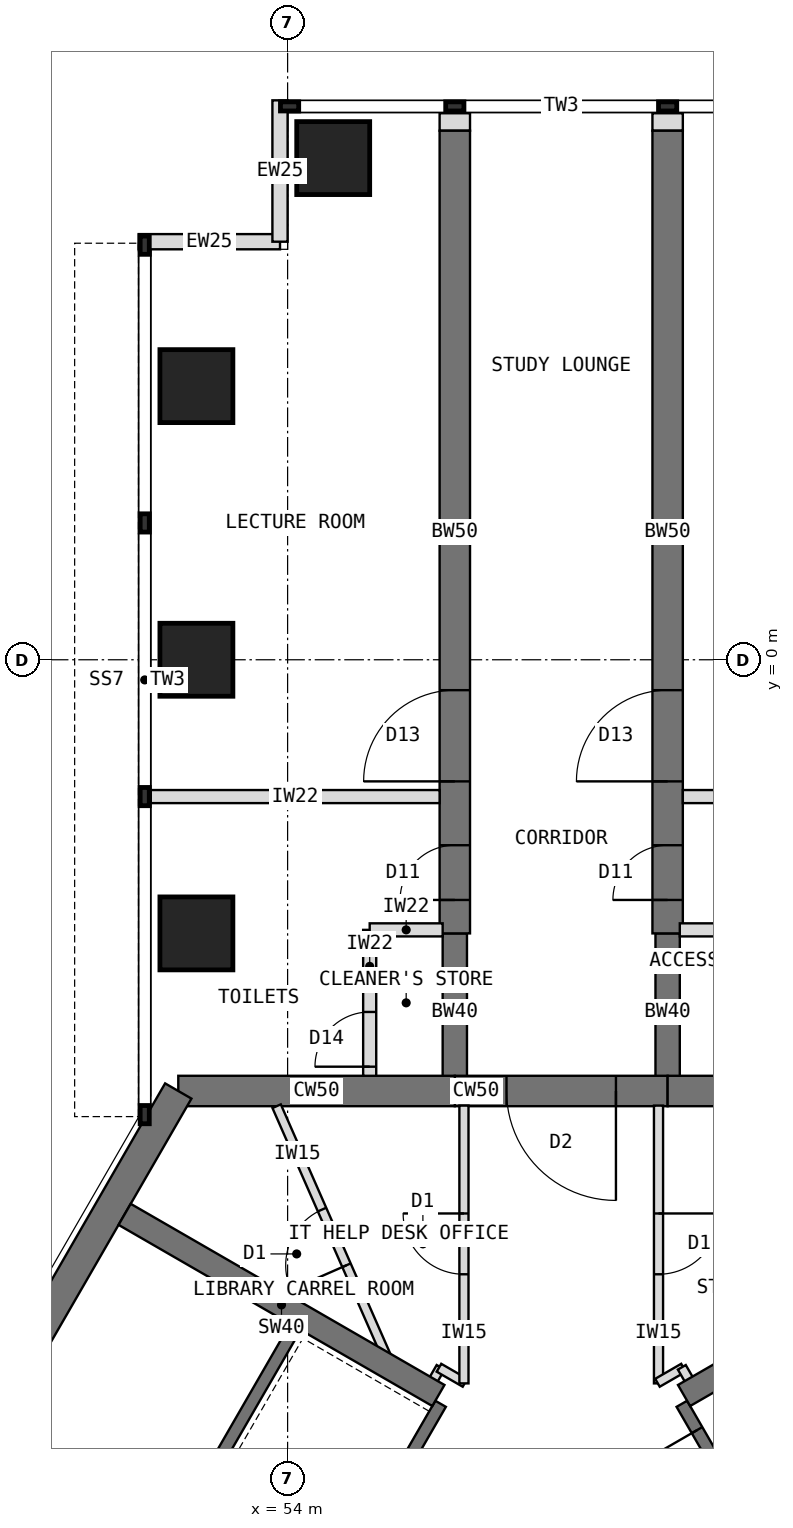
"""IFC4 building model, lengths in metres.
Left out: names, types, materials, properties, quantities, classifications, styles, units other than length and angle.
Written with IfcOpenShell. Run it as: python <this file> out.ifc"""

import sys

from ifc_helpers import new_model, si_unit, direction, frame, frame_2d, origin, origin_2d, place, context, subcontext, project, spatial, rectangle, extrude, element, fill, save


model = new_model("IFC4")
c1 = context("Model", 3, precision=1e-05, world=origin(), true_north=direction((0.0, 1.0)))
c2 = subcontext(c1, "Body", "Model", "MODEL_VIEW")
j1 = project(units=[si_unit("LENGTHUNIT", "METRE"), si_unit("PLANEANGLEUNIT", "RADIAN")], contexts=[c1])
p1 = place(None, origin())
s1 = spatial("IfcSite", under=j1, at=p1, CompositionType="ELEMENT")
p2 = place(p1, origin())
s2 = spatial("IfcBuilding", under=s1, at=p2, CompositionType="ELEMENT")
p3 = place(p2, frame((0.0, 0.0, 174.5)))
s3 = spatial("IfcBuildingStorey", under=s2, at=p3, CompositionType="ELEMENT", Elevation=174.5)
p4 = place(p3, frame((64.798, -7.092, 0.0), z_axis=(0.0, 0.0, 1.0), x_axis=(-1.0, 0.0, 0.0)))
e1 = element("IfcWall", 1, at=p4, inside=s3, PredefinedType="SHEAR", context=c2, shape_type="SweptSolid", body=[
    extrude(rectangle(XDim=4.548, YDim=0.5, at=frame_2d((2.274, 0.0))), origin(), (0.0, 0.0, 1.0), 4.0),
])
p5 = place(p3, frame((60.25, -7.092, 0.0), z_axis=(0.0, 0.0, 1.0), x_axis=(-1.0, 0.0, 0.0)))
e2 = element("IfcWall", 2, at=p5, inside=s3, PredefinedType="SHEAR", context=c2, shape_type="SweptSolid", body=[
    extrude(rectangle(XDim=3.5, YDim=0.5, at=frame_2d((1.75, 0.0))), origin(), (0.0, 0.0, 1.0), 4.0),
])
p6 = place(p5, frame((0.85, 0.0, 0.0)))
e3 = element("IfcOpeningElement", 3, at=p6, cuts=e2, PredefinedType="OPENING", context=c2, shape_type="SweptSolid", body=[
    extrude(rectangle(XDim=1.8, YDim=2.1, at=frame_2d((0.9, 1.05))), frame((0.0, 0.26, 0.0), z_axis=(0.0, -1.0, 0.0), x_axis=(1.0, 0.0, 0.0)), (0.0, 0.0, 1.0), 0.52),
])
p7 = place(p3, frame((56.75, -7.092, 0.0), z_axis=(0.0, 0.0, 1.0), x_axis=(-1.0, 0.0, 0.0)))
e4 = element("IfcWall", 4, at=p7, inside=s3, PredefinedType="SHEAR", context=c2, shape_type="SweptSolid", body=[
    extrude(rectangle(XDim=4.548, YDim=0.5, at=frame_2d((2.274, 0.0))), origin(), (0.0, 0.0, 1.0), 4.0),
])
p8 = place(p3, frame((52.202, -7.092, 0.0), z_axis=(0.0, 0.0, 1.0), x_axis=(-0.500005998175, -0.866021940709, 0.0)))
e5 = element("IfcWall", 5, at=p8, inside=s3, PredefinedType="SHEAR", context=c2, shape_type="SweptSolid", body=[
    extrude(rectangle(XDim=12.596, YDim=0.5, at=frame_2d((6.298, 0.0))), origin(), (0.0, 0.0, 1.0), 4.0),
])
p9 = place(p3, frame((56.75, -7.092, 0.0), z_axis=(0.0, 0.0, 1.0), x_axis=(0.0, 1.0, 0.0)))
e6 = element("IfcWall", 6, at=p9, inside=s3, PredefinedType="SHEAR", context=c2, shape_type="SweptSolid", body=[
    extrude(rectangle(XDim=2.592, YDim=0.4, at=frame_2d((1.296, 0.0))), origin(), (0.0, 0.0, 1.0), 4.0),
])
p10 = place(p3, frame((56.75, -4.5, 0.0), z_axis=(0.0, 0.0, 1.0), x_axis=(0.0, 1.0, 0.0)))
e7 = element("IfcWall", 7, at=p10, inside=s3, PredefinedType="SHEAR", context=c2, shape_type="SweptSolid", body=[
    extrude(rectangle(XDim=13.2, YDim=0.5, at=frame_2d((6.6, 0.0))), origin(), (0.0, 0.0, 1.0), 4.0),
])
p11 = place(p10, frame((0.55, 0.0, 0.0)))
e8 = element("IfcOpeningElement", 8, at=p11, cuts=e7, PredefinedType="OPENING", context=c2, shape_type="SweptSolid", body=[
    extrude(rectangle(XDim=0.9, YDim=2.1, at=frame_2d((0.45, 1.05))), frame((0.0, 0.26, 0.0), z_axis=(0.0, -1.0, 0.0), x_axis=(1.0, 0.0, 0.0)), (0.0, 0.0, 1.0), 0.52),
])
p12 = place(p10, frame((2.5, 0.0, 0.0)))
e9 = element("IfcOpeningElement", 9, at=p12, cuts=e7, PredefinedType="OPENING", context=c2, shape_type="SweptSolid", body=[
    extrude(rectangle(XDim=1.5, YDim=2.1, at=frame_2d((0.75, 1.05))), frame((0.0, 0.26, 0.0), z_axis=(0.0, -1.0, 0.0), x_axis=(1.0, 0.0, 0.0)), (0.0, 0.0, 1.0), 0.52),
])
p13 = place(p3, frame((60.25, -7.092, 0.0), z_axis=(0.0, 0.0, 1.0), x_axis=(0.0, 1.0, 0.0)))
e10 = element("IfcWall", 10, at=p13, inside=s3, PredefinedType="SHEAR", context=c2, shape_type="SweptSolid", body=[
    extrude(rectangle(XDim=2.592, YDim=0.4, at=frame_2d((1.296, 0.0))), origin(), (0.0, 0.0, 1.0), 4.0),
])
p14 = place(p3, frame((60.25, -4.5, 0.0), z_axis=(0.0, 0.0, 1.0), x_axis=(0.0, 1.0, 0.0)))
e11 = element("IfcWall", 11, at=p14, inside=s3, PredefinedType="SHEAR", context=c2, shape_type="SweptSolid", body=[
    extrude(rectangle(XDim=13.2, YDim=0.5, at=frame_2d((6.6, 0.0))), origin(), (0.0, 0.0, 1.0), 4.0),
])
p15 = place(p14, frame((0.55, 0.0, 0.0)))
e12 = element("IfcOpeningElement", 12, at=p15, cuts=e11, PredefinedType="OPENING", context=c2, shape_type="SweptSolid", body=[
    extrude(rectangle(XDim=0.9, YDim=2.1, at=frame_2d((0.45, 1.05))), frame((0.0, 0.26, 0.0), z_axis=(0.0, -1.0, 0.0), x_axis=(1.0, 0.0, 0.0)), (0.0, 0.0, 1.0), 0.52),
])
p16 = place(p14, frame((2.5, 0.0, 0.0)))
e13 = element("IfcOpeningElement", 13, at=p16, cuts=e11, PredefinedType="OPENING", context=c2, shape_type="SweptSolid", body=[
    extrude(rectangle(XDim=1.5, YDim=2.1, at=frame_2d((0.75, 1.05))), frame((0.0, 0.26, 0.0), z_axis=(0.0, -1.0, 0.0), x_axis=(1.0, 0.0, 0.0)), (0.0, 0.0, 1.0), 0.52),
])
for number, where, z_axis, x_axis in (
    (14, (52.5, -4.5, 0.0), (0.0, 0.0, 1.0), (1.0, 0.0, 0.0)),
    (15, (52.5, 0.0, 0.0), (0.0, 0.0, 1.0), (1.0, 0.0, 0.0)),
    (16, (52.5, 4.5, 0.0), (0.0, 0.0, 1.0), (1.0, 0.0, 0.0)),
    (17, (54.75, 8.25, 0.0), (0.0, 0.0, 1.0), (1.0, 0.0, 0.0)),
):
    element("IfcColumn", number, at=place(p3, frame(where, z_axis=z_axis, x_axis=x_axis)), inside=s3, PredefinedType="COLUMN", context=c2, shape_type="SweptSolid", body=[
        extrude(rectangle(XDim=1.2, YDim=1.2, at=origin_2d()), origin(), (0.0, 0.0, 1.0), 4.0),
    ])
for number, where, z_axis, x_axis in (
    (18, (51.55, 6.875, 0.0), (0.0, 0.0, 1.0), (1.0, 0.0, 0.0)),
    (19, (53.875, 6.875, 0.0), (0.0, 0.0, 1.0), (0.0, 1.0, 0.0)),
):
    element("IfcWall", number, at=place(p3, frame(where, z_axis=z_axis, x_axis=x_axis)), inside=s3, PredefinedType="STANDARD", context=c2, shape_type="SweptSolid", body=[
        extrude(rectangle(XDim=2.325, YDim=0.25, at=frame_2d((1.163, 0.0))), origin(), (0.0, 0.0, 1.0), 3.8),
    ])
for number, where, z_axis, x_axis in (
    (20, (56.75, 8.7, 0.0), (0.0, 0.0, 1.0), (0.0, 1.0, 0.0)),
    (21, (60.25, 8.7, 0.0), (0.0, 0.0, 1.0), (0.0, 1.0, 0.0)),
):
    element("IfcWall", number, at=place(p3, frame(where, z_axis=z_axis, x_axis=x_axis)), inside=s3, PredefinedType="PARTITIONING", context=c2, shape_type="SweptSolid", body=[
        extrude(rectangle(XDim=0.288, YDim=0.5, at=frame_2d((0.144, 0.0))), origin(), (0.0, 0.0, 1.0), 3.8),
    ])
p17 = place(p3, frame((56.516, -12.236, 0.0), z_axis=(0.0, 0.0, 1.0), x_axis=(-0.49999894854, -0.866026010844, 0.0)))
e22 = element("IfcWall", 22, at=p17, inside=s3, PredefinedType="SHEAR", context=c2, shape_type="SweptSolid", body=[
    extrude(rectangle(XDim=8.0, YDim=0.2, at=frame_2d((4.0, 0.0))), origin(), (0.0, 0.0, 1.0), 4.0),
])
p18 = place(p17, frame((6.3, 0.0, 0.0)))
e23 = element("IfcOpeningElement", 23, at=p18, cuts=e22, PredefinedType="OPENING", context=c2, shape_type="SweptSolid", body=[
    extrude(rectangle(XDim=1.2, YDim=2.1, at=frame_2d((0.6, 1.05))), frame((0.0, 0.11, 0.0), z_axis=(0.0, -1.0, 0.0), x_axis=(1.0, 0.0, 0.0)), (0.0, 0.0, 1.0), 0.22),
])
p19 = place(p3, frame((54.178, -10.886, 0.0), z_axis=(0.0, 0.0, 1.0), x_axis=(-0.49999894854, -0.866026010844, 0.0)))
e24 = element("IfcWall", 24, at=p19, inside=s3, PredefinedType="SHEAR", context=c2, shape_type="SweptSolid", body=[
    extrude(rectangle(XDim=8.0, YDim=0.2, at=frame_2d((4.0, 0.0))), origin(), (0.0, 0.0, 1.0), 4.0),
])
p20 = place(p19, frame((6.8, 0.0, 0.0)))
e25 = element("IfcOpeningElement", 25, at=p20, cuts=e24, PredefinedType="OPENING", context=c2, shape_type="SweptSolid", body=[
    extrude(rectangle(XDim=0.9, YDim=2.1, at=frame_2d((0.45, 1.05))), frame((0.0, 0.11, 0.0), z_axis=(0.0, -1.0, 0.0), x_axis=(1.0, 0.0, 0.0)), (0.0, 0.0, 1.0), 0.22),
])
p21 = place(p3, frame((56.48, -12.099, 0.0), z_axis=(0.0, 0.0, 1.0), x_axis=(-0.86602319114, 0.500003832394, 0.0)))
e26 = element("IfcWall", 26, at=p21, inside=s3, PredefinedType="SHEAR", context=c2, shape_type="SweptSolid", body=[
    extrude(rectangle(XDim=5.958, YDim=0.4, at=frame_2d((2.979, 0.0))), origin(), (0.0, 0.0, 1.0), 4.0),
])
p22 = place(p3, frame((64.484, -19.164, 0.0), z_axis=(0.0, 0.0, 1.0), x_axis=(-0.49999894854, 0.866026010844, 0.0)))
e27 = element("IfcWall", 27, at=p22, inside=s3, PredefinedType="SHEAR", context=c2, shape_type="SweptSolid", body=[
    extrude(rectangle(XDim=8.0, YDim=0.2, at=frame_2d((4.0, 0.0))), origin(), (0.0, 0.0, 1.0), 4.0),
])
p23 = place(p22, frame((6.3, 0.0, 0.0)))
e28 = element("IfcOpeningElement", 28, at=p23, cuts=e27, PredefinedType="OPENING", context=c2, shape_type="SweptSolid", body=[
    extrude(rectangle(XDim=1.2, YDim=2.1, at=frame_2d((0.6, 1.05))), frame((0.0, 0.11, 0.0), z_axis=(0.0, -1.0, 0.0), x_axis=(1.0, 0.0, 0.0)), (0.0, 0.0, 1.0), 0.22),
])
p24 = place(p22, frame((0.9, 0.0, 0.0)))
e29 = element("IfcOpeningElement", 29, at=p24, cuts=e27, PredefinedType="OPENING", context=c2, shape_type="SweptSolid", body=[
    extrude(rectangle(XDim=1.1, YDim=2.2, at=frame_2d((0.55, 1.1))), frame((0.0, 0.11, 0.0), z_axis=(0.0, -1.0, 0.0), x_axis=(1.0, 0.0, 0.0)), (0.0, 0.0, 1.0), 0.22),
])
p25 = place(p22, frame((3.8, 0.0, 0.0)))
e30 = element("IfcOpeningElement", 30, at=p25, cuts=e27, PredefinedType="OPENING", context=c2, shape_type="SweptSolid", body=[
    extrude(rectangle(XDim=1.1, YDim=2.2, at=frame_2d((0.55, 1.1))), frame((0.0, 0.11, 0.0), z_axis=(0.0, -1.0, 0.0), x_axis=(1.0, 0.0, 0.0)), (0.0, 0.0, 1.0), 0.22),
])
p26 = place(p3, frame((60.52, -12.099, 0.0), z_axis=(0.0, 0.0, 1.0), x_axis=(0.86602319114, 0.500003832394, 0.0)))
e31 = element("IfcWall", 31, at=p26, inside=s3, PredefinedType="SHEAR", context=c2, shape_type="SweptSolid", body=[
    extrude(rectangle(XDim=5.958, YDim=0.4, at=frame_2d((2.979, 0.0))), origin(), (0.0, 0.0, 1.0), 4.0),
])
p27 = place(p3, frame((56.5, -2.25, 0.0), z_axis=(0.0, 0.0, 1.0), x_axis=(-1.0, 0.0, 0.0)))
e32 = element("IfcWall", 32, at=p27, inside=s3, PredefinedType="PARTITIONING", context=c2, shape_type="SweptSolid", body=[
    extrude(rectangle(XDim=4.75, YDim=0.215, at=frame_2d((2.375, 0.0))), origin(), (0.0, 0.0, 1.0), 3.8),
])
p28 = place(p3, frame((55.35, -6.842, 0.0), z_axis=(0.0, 0.0, 1.0), x_axis=(0.0, 1.0, 0.0)))
e33 = element("IfcWall", 33, at=p28, inside=s3, PredefinedType="PARTITIONING", context=c2, shape_type="SweptSolid", body=[
    extrude(rectangle(XDim=2.4, YDim=0.215, at=frame_2d((1.2, 0.0))), origin(), (0.0, 0.0, 1.0), 3.8),
])
p29 = place(p28, frame((0.15, 0.0, 0.0)))
e34 = element("IfcOpeningElement", 34, at=p29, cuts=e33, PredefinedType="OPENING", context=c2, shape_type="SweptSolid", body=[
    extrude(rectangle(XDim=0.9, YDim=2.1, at=frame_2d((0.45, 1.05))), frame((0.0, 0.117, 0.0), z_axis=(0.0, -1.0, 0.0), x_axis=(1.0, 0.0, 0.0)), (0.0, 0.0, 1.0), 0.235),
])
p30 = place(p3, frame((56.55, -4.442, 0.0), z_axis=(0.0, 0.0, 1.0), x_axis=(-1.0, 0.0, 0.0)))
e35 = element("IfcWall", 35, at=p30, inside=s3, PredefinedType="PARTITIONING", context=c2, shape_type="SweptSolid", body=[
    extrude(rectangle(XDim=1.2, YDim=0.215, at=frame_2d((0.6, 0.0))), origin(), (0.0, 0.0, 1.0), 3.267),
])
p31 = place(p3, frame((60.5, -2.25, 0.0), z_axis=(0.0, 0.0, 1.0), x_axis=(1.0, 0.0, 0.0)))
e36 = element("IfcWall", 36, at=p31, inside=s3, PredefinedType="PARTITIONING", context=c2, shape_type="SweptSolid", body=[
    extrude(rectangle(XDim=4.75, YDim=0.215, at=frame_2d((2.375, 0.0))), origin(), (0.0, 0.0, 1.0), 3.8),
])
p32 = place(p3, frame((60.45, -4.442, 0.0), z_axis=(0.0, 0.0, 1.0), x_axis=(1.0, 0.0, 0.0)))
e37 = element("IfcWall", 37, at=p32, inside=s3, PredefinedType="PARTITIONING", context=c2, shape_type="SweptSolid", body=[
    extrude(rectangle(XDim=3.2, YDim=0.215, at=frame_2d((1.6, 0.0))), origin(), (0.0, 0.0, 1.0), 3.267),
])
p33 = place(p3, frame((56.302, -12.008, 0.0), z_axis=(0.0, 0.0, 1.0), x_axis=(0.500230298122, 0.865892400268, 0.0)))
e38 = element("IfcWall", 38, at=p33, inside=s3, PredefinedType="PARTITIONING", context=c2, shape_type="SweptSolid", body=[
    extrude(rectangle(XDim=0.43, YDim=0.15, at=frame_2d((0.215, 0.0))), origin(), (0.0, 0.0, 1.0), 3.8),
])
p34 = place(p3, frame((56.489, -11.643, 0.0), z_axis=(0.0, 0.0, 1.0), x_axis=(0.865831790172, -0.50033519877, 0.0)))
e39 = element("IfcWall", 39, at=p34, inside=s3, PredefinedType="PARTITIONING", context=c2, shape_type="SweptSolid", body=[
    extrude(rectangle(XDim=0.494, YDim=0.15, at=frame_2d((0.247, 0.0))), origin(), (0.0, 0.0, 1.0), 3.8),
])
p35 = place(p3, frame((56.9, -11.9, 0.0), z_axis=(0.0, 0.0, 1.0), x_axis=(0.0, 1.0, 0.0)))
e40 = element("IfcWall", 40, at=p35, inside=s3, PredefinedType="PARTITIONING", context=c2, shape_type="SweptSolid", body=[
    extrude(rectangle(XDim=4.568, YDim=0.15, at=frame_2d((2.284, 0.0))), origin(), (0.0, 0.0, 1.0), 3.8),
])
p36 = place(p35, frame((1.794, 0.0, 0.0)))
e41 = element("IfcOpeningElement", 41, at=p36, cuts=e40, PredefinedType="OPENING", context=c2, shape_type="SweptSolid", body=[
    extrude(rectangle(XDim=1.0, YDim=2.1, at=frame_2d((0.5, 1.05))), frame((0.0, 0.085, 0.0), z_axis=(0.0, -1.0, 0.0), x_axis=(1.0, 0.0, 0.0)), (0.0, 0.0, 1.0), 0.17),
])
p37 = place(p3, frame((60.1, -7.332, 0.0), z_axis=(0.0, 0.0, 1.0), x_axis=(0.0, -1.0, 0.0)))
e42 = element("IfcWall", 42, at=p37, inside=s3, PredefinedType="PARTITIONING", context=c2, shape_type="SweptSolid", body=[
    extrude(rectangle(XDim=4.568, YDim=0.15, at=frame_2d((2.284, 0.0))), origin(), (0.0, 0.0, 1.0), 3.8),
])
p38 = place(p37, frame((1.774, 0.0, 0.0)))
e43 = element("IfcOpeningElement", 43, at=p38, cuts=e42, PredefinedType="OPENING", context=c2, shape_type="SweptSolid", body=[
    extrude(rectangle(XDim=1.0, YDim=2.1, at=frame_2d((0.5, 1.05))), frame((0.0, 0.085, 0.0), z_axis=(0.0, -1.0, 0.0), x_axis=(1.0, 0.0, 0.0)), (0.0, 0.0, 1.0), 0.17),
])
p39 = place(p3, frame((60.083, -11.89, 0.0), z_axis=(0.0, 0.0, 1.0), x_axis=(0.865831790172, 0.50033519877, 0.0)))
e44 = element("IfcWall", 44, at=p39, inside=s3, PredefinedType="PARTITIONING", context=c2, shape_type="SweptSolid", body=[
    extrude(rectangle(XDim=0.494, YDim=0.15, at=frame_2d((0.247, 0.0))), origin(), (0.0, 0.0, 1.0), 3.8),
])
p40 = place(p3, frame((60.483, -11.635, 0.0), z_axis=(0.0, 0.0, 1.0), x_axis=(0.500230298122, -0.865892400268, 0.0)))
e45 = element("IfcWall", 45, at=p40, inside=s3, PredefinedType="PARTITIONING", context=c2, shape_type="SweptSolid", body=[
    extrude(rectangle(XDim=0.43, YDim=0.15, at=frame_2d((0.215, 0.0))), origin(), (0.0, 0.0, 1.0), 3.8),
])
p41 = place(p3, frame((55.715, -11.658, 0.0), z_axis=(0.0, 0.0, 1.0), x_axis=(-0.402073730919, 0.915607292951, 0.0)))
e46 = element("IfcWall", 46, at=p41, inside=s3, PredefinedType="PARTITIONING", context=c2, shape_type="SweptSolid", body=[
    extrude(rectangle(XDim=4.714, YDim=0.15, at=frame_2d((2.357, 0.0))), origin(), (0.0, 0.0, 1.0), 3.8),
])
p42 = place(p41, frame((1.857, 0.0, 0.0)))
e47 = element("IfcOpeningElement", 47, at=p42, cuts=e46, PredefinedType="OPENING", context=c2, shape_type="SweptSolid", body=[
    extrude(rectangle(XDim=1.0, YDim=2.1, at=frame_2d((0.5, 1.05))), frame((0.0, 0.085, 0.0), z_axis=(0.0, -1.0, 0.0), x_axis=(1.0, 0.0, 0.0)), (0.0, 0.0, 1.0), 0.17),
])
p43 = place(p23, origin())
e48 = element("IfcDoor", 48, at=p43, inside=s3, OperationType="SINGLE_SWING_RIGHT", PredefinedType="DOOR", context=c2, shape_type="SweptSolid", body=[
    extrude(rectangle(XDim=1.2, YDim=2.1, at=frame_2d((0.6, 1.05))), frame((0.0, 0.025, 0.0), z_axis=(0.0, -1.0, 0.0), x_axis=(1.0, 0.0, 0.0)), (0.0, 0.0, 1.0), 0.05),
])
fill(e28, e48)
p44 = place(p6, origin())
e49 = element("IfcDoor", 49, at=p44, inside=s3, OperationType="DOUBLE_DOOR_DOUBLE_SWING", PredefinedType="DOOR", context=c2, shape_type="SweptSolid", body=[
    extrude(rectangle(XDim=1.8, YDim=2.1, at=frame_2d((0.9, 1.05))), frame((0.0, 0.025, 0.0), z_axis=(0.0, -1.0, 0.0), x_axis=(1.0, 0.0, 0.0)), (0.0, 0.0, 1.0), 0.05),
])
fill(e3, e49)
p45 = place(p29, origin())
e50 = element("IfcDoor", 50, at=p45, inside=s3, OperationType="SINGLE_SWING_LEFT", PredefinedType="DOOR", context=c2, shape_type="SweptSolid", body=[
    extrude(rectangle(XDim=0.9, YDim=2.1, at=frame_2d((0.45, 1.05))), frame((0.0, 0.025, 0.0), z_axis=(0.0, -1.0, 0.0), x_axis=(1.0, 0.0, 0.0)), (0.0, 0.0, 1.0), 0.05),
])
fill(e34, e50)
p46 = place(p38, origin())
e51 = element("IfcDoor", 51, at=p46, inside=s3, OperationType="SINGLE_SWING_LEFT", PredefinedType="DOOR", context=c2, shape_type="SweptSolid", body=[
    extrude(rectangle(XDim=1.0, YDim=2.1, at=frame_2d((0.5, 1.05))), frame((0.0, 0.025, 0.0), z_axis=(0.0, -1.0, 0.0), x_axis=(1.0, 0.0, 0.0)), (0.0, 0.0, 1.0), 0.05),
])
fill(e43, e51)
p47 = place(p42, origin())
e52 = element("IfcDoor", 52, at=p47, inside=s3, OperationType="SINGLE_SWING_LEFT", PredefinedType="DOOR", context=c2, shape_type="SweptSolid", body=[
    extrude(rectangle(XDim=1.0, YDim=2.1, at=frame_2d((0.5, 1.05))), frame((0.0, 0.025, 0.0), z_axis=(0.0, -1.0, 0.0), x_axis=(1.0, 0.0, 0.0)), (0.0, 0.0, 1.0), 0.05),
])
fill(e47, e52)
p48 = place(p36, origin())
e53 = element("IfcDoor", 53, at=p48, inside=s3, OperationType="SINGLE_SWING_RIGHT", PredefinedType="DOOR", context=c2, shape_type="SweptSolid", body=[
    extrude(rectangle(XDim=1.0, YDim=2.1, at=frame_2d((0.5, 1.05))), frame((0.0, 0.025, 0.0), z_axis=(0.0, -1.0, 0.0), x_axis=(1.0, 0.0, 0.0)), (0.0, 0.0, 1.0), 0.05),
])
fill(e41, e53)
p49 = place(p11, origin())
e54 = element("IfcDoor", 54, at=p49, inside=s3, OperationType="SINGLE_SWING_LEFT", PredefinedType="DOOR", context=c2, shape_type="SweptSolid", body=[
    extrude(rectangle(XDim=0.9, YDim=2.1, at=frame_2d((0.45, 1.05))), frame((0.0, 0.025, 0.0), z_axis=(0.0, -1.0, 0.0), x_axis=(1.0, 0.0, 0.0)), (0.0, 0.0, 1.0), 0.05),
])
fill(e8, e54)
p50 = place(p12, origin())
e55 = element("IfcDoor", 55, at=p50, inside=s3, OperationType="DOUBLE_DOOR_SINGLE_SWING", PredefinedType="DOOR", context=c2, shape_type="SweptSolid", body=[
    extrude(rectangle(XDim=1.5, YDim=2.1, at=frame_2d((0.75, 1.05))), frame((0.0, 0.025, 0.0), z_axis=(0.0, -1.0, 0.0), x_axis=(1.0, 0.0, 0.0)), (0.0, 0.0, 1.0), 0.05),
])
fill(e9, e55)
p51 = place(p15, origin())
e56 = element("IfcDoor", 56, at=p51, inside=s3, OperationType="SINGLE_SWING_LEFT", PredefinedType="DOOR", context=c2, shape_type="SweptSolid", body=[
    extrude(rectangle(XDim=0.9, YDim=2.1, at=frame_2d((0.45, 1.05))), frame((0.0, 0.025, 0.0), z_axis=(0.0, -1.0, 0.0), x_axis=(1.0, 0.0, 0.0)), (0.0, 0.0, 1.0), 0.05),
])
fill(e12, e56)
p52 = place(p16, origin())
e57 = element("IfcDoor", 57, at=p52, inside=s3, OperationType="DOUBLE_DOOR_SINGLE_SWING", PredefinedType="DOOR", context=c2, shape_type="SweptSolid", body=[
    extrude(rectangle(XDim=1.5, YDim=2.1, at=frame_2d((0.75, 1.05))), frame((0.0, 0.025, 0.0), z_axis=(0.0, -1.0, 0.0), x_axis=(1.0, 0.0, 0.0)), (0.0, 0.0, 1.0), 0.05),
])
fill(e13, e57)
save(model, sys.argv[1])
